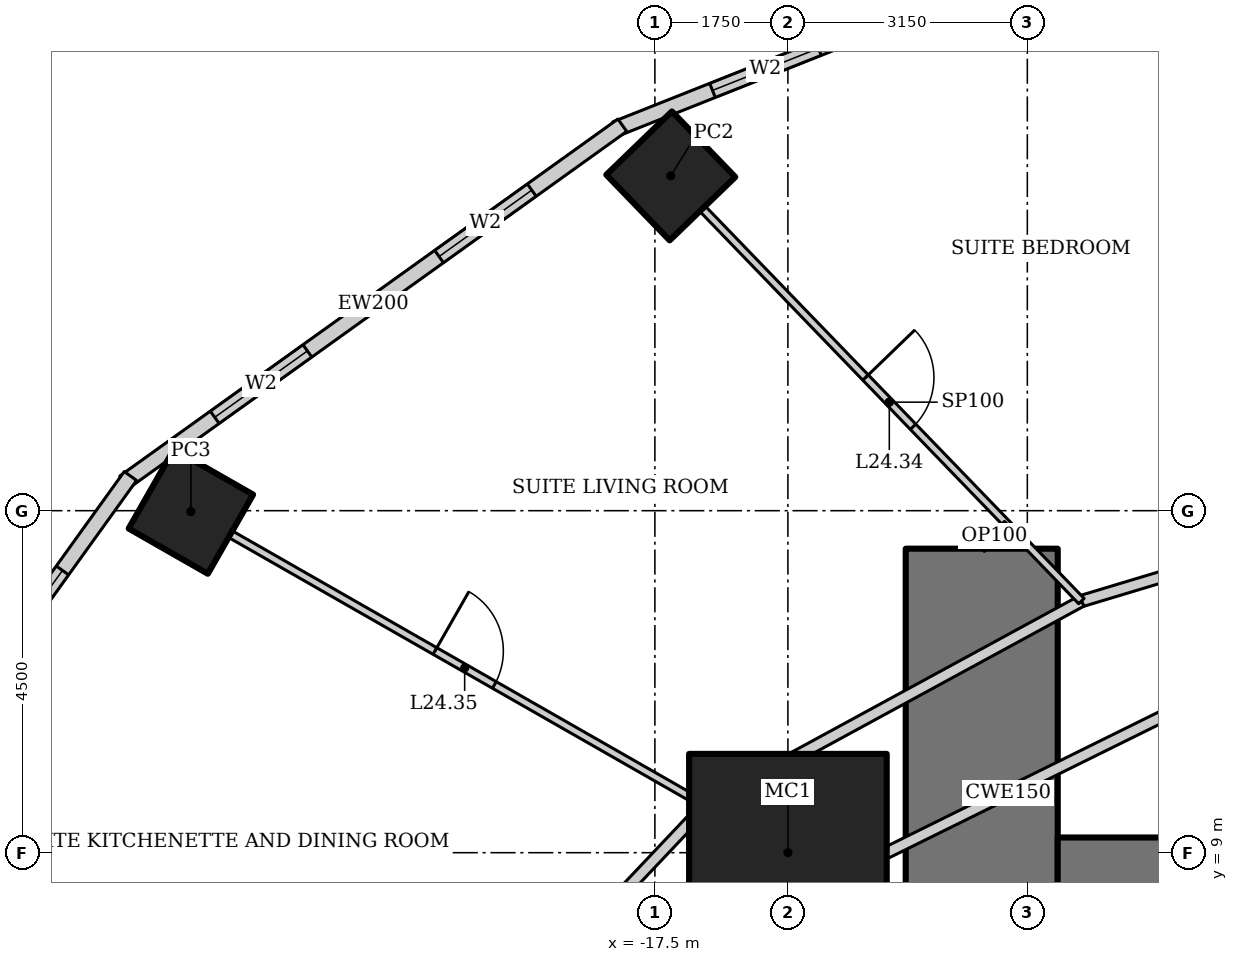
"""IFC4 building model, lengths in metres.
Left out: names, types, materials, properties, quantities, classifications, styles, units other than length and angle.
Written with IfcOpenShell. Run it as: python <this file> out.ifc"""

import sys

from ifc_helpers import new_model, si_unit, direction, frame, frame_2d, origin, origin_2d, place, context, subcontext, project, spatial, rectangle, hollow_rectangle, extrude, element, fill, save


model = new_model("IFC4")
c1 = context("Model", 3, precision=1e-05, world=origin(), true_north=direction((0.0, 1.0)))
c2 = subcontext(c1, "Body", "Model", "MODEL_VIEW")
j1 = project(units=[si_unit("LENGTHUNIT", "METRE"), si_unit("PLANEANGLEUNIT", "RADIAN")], contexts=[c1])
p1 = place(None, origin())
s1 = spatial("IfcSite", under=j1, at=p1, CompositionType="ELEMENT")
p2 = place(p1, origin())
s2 = spatial("IfcBuilding", under=s1, at=p2, CompositionType="ELEMENT")
p3 = place(p2, frame((0.0, 0.0, 101.8)))
s3 = spatial("IfcBuildingStorey", under=s2, at=p3, CompositionType="ELEMENT", Elevation=101.8)
p4 = place(p3, frame((-15.75, 9.0, 0.0), z_axis=(0.0, 0.0, 1.0), x_axis=(1.0, 0.0, 0.0)))
e1 = element("IfcColumn", 1, at=p4, inside=s3, PredefinedType="COLUMN", context=c2, shape_type="SweptSolid", body=[
    extrude(hollow_rectangle(XDim=2.6, YDim=2.6, WallThickness=0.13, at=origin_2d()), origin(), (0.0, 0.0, 1.0), 3.6),
])
p5 = place(p3, frame((-17.291, 17.905, 0.0), z_axis=(0.0, 0.0, 1.0), x_axis=(0.719339800339, 0.694658370459, 0.0)))
e2 = element("IfcColumn", 2, at=p5, inside=s3, PredefinedType="COLUMN", context=c2, shape_type="SweptSolid", body=[
    extrude(hollow_rectangle(XDim=1.2, YDim=1.2, WallThickness=0.1, at=origin_2d()), origin(), (0.0, 0.0, 1.0), 2.28),
])
p6 = place(p3, frame((-23.605, 13.489, 0.0), z_axis=(0.0, 0.0, 1.0), x_axis=(0.496139221777, 0.86824298017, 0.0)))
e3 = element("IfcColumn", 3, at=p6, inside=s3, PredefinedType="COLUMN", context=c2, shape_type="SweptSolid", body=[
    extrude(hollow_rectangle(XDim=1.2, YDim=1.2, WallThickness=0.12, at=origin_2d()), origin(), (0.0, 0.0, 1.0), 2.28),
])
p7 = place(p3, frame((-13.2, 13.0, 0.0), z_axis=(0.0, 0.0, 1.0), x_axis=(0.0, -1.0, 0.0)))
e4 = element("IfcWall", 4, at=p7, inside=s3, PredefinedType="SHEAR", context=c2, shape_type="SweptSolid", body=[
    extrude(rectangle(XDim=26.0, YDim=2.0, at=frame_2d((13.0, 0.0))), origin(), (0.0, 0.0, 1.0), 3.6),
])
p8 = place(p7, frame((12.1, 0.0, 0.0)))
e5 = element("IfcOpeningElement", 5, at=p8, cuts=e4, PredefinedType="OPENING", context=c2, shape_type="SweptSolid", body=[
    extrude(rectangle(XDim=1.8, YDim=2.1, at=frame_2d((0.9, 1.05))), frame((0.0, 1.01, 0.0), z_axis=(0.0, -1.0, 0.0), x_axis=(1.0, 0.0, 0.0)), (0.0, 0.0, 1.0), 2.02),
])
p9 = place(p3, frame((12.2, 8.0, 0.0), z_axis=(0.0, 0.0, 1.0), x_axis=(-1.0, 0.0, 0.0)))
e6 = element("IfcWall", 6, at=p9, inside=s3, PredefinedType="SHEAR", context=c2, shape_type="SweptSolid", body=[
    extrude(rectangle(XDim=24.4, YDim=2.4, at=frame_2d((12.2, 0.0))), origin(), (0.0, 0.0, 1.0), 3.6),
])
p10 = place(p3, frame((-10.869, 21.363, 0.0), z_axis=(0.0, 0.0, 1.0), x_axis=(-0.929358351251, -0.369178892895, 0.0)))
e7 = element("IfcWall", 7, at=p10, inside=s3, PredefinedType="SOLIDWALL", context=c2, shape_type="SweptSolid", body=[
    extrude(rectangle(XDim=7.692, YDim=0.2, at=frame_2d((3.846, 0.0))), origin(), (0.0, 0.0, 1.0), 3.4),
])
p11 = place(p10, frame((1.373, 0.0, 0.5)))
e8 = element("IfcOpeningElement", 8, at=p11, cuts=e7, PredefinedType="OPENING", context=c2, shape_type="SweptSolid", body=[
    extrude(rectangle(XDim=1.5, YDim=2.2, at=frame_2d((0.75, 1.1))), frame((0.0, 0.11, 0.0), z_axis=(0.0, -1.0, 0.0), x_axis=(1.0, 0.0, 0.0)), (0.0, 0.0, 1.0), 0.22),
])
p12 = place(p10, frame((4.819, 0.0, 0.5)))
e9 = element("IfcOpeningElement", 9, at=p12, cuts=e7, PredefinedType="OPENING", context=c2, shape_type="SweptSolid", body=[
    extrude(rectangle(XDim=1.5, YDim=2.2, at=frame_2d((0.75, 1.1))), frame((0.0, 0.11, 0.0), z_axis=(0.0, -1.0, 0.0), x_axis=(1.0, 0.0, 0.0)), (0.0, 0.0, 1.0), 0.22),
])
p13 = place(p3, frame((-17.929, 18.572, 0.0), z_axis=(0.0, 0.0, 1.0), x_axis=(-0.812791321576, -0.582554948112, 0.0)))
e10 = element("IfcWall", 10, at=p13, inside=s3, PredefinedType="SOLIDWALL", context=c2, shape_type="SweptSolid", body=[
    extrude(rectangle(XDim=8.063, YDim=0.2, at=frame_2d((4.032, 0.0))), origin(), (0.0, 0.0, 1.0), 3.4),
])
p14 = place(p13, frame((1.466, 0.0, 0.5)))
e11 = element("IfcOpeningElement", 11, at=p14, cuts=e10, PredefinedType="OPENING", context=c2, shape_type="SweptSolid", body=[
    extrude(rectangle(XDim=1.5, YDim=2.2, at=frame_2d((0.75, 1.1))), frame((0.0, 0.11, 0.0), z_axis=(0.0, -1.0, 0.0), x_axis=(1.0, 0.0, 0.0)), (0.0, 0.0, 1.0), 0.22),
])
p15 = place(p13, frame((5.097, 0.0, 0.5)))
e12 = element("IfcOpeningElement", 12, at=p15, cuts=e10, PredefinedType="OPENING", context=c2, shape_type="SweptSolid", body=[
    extrude(rectangle(XDim=1.5, YDim=2.2, at=frame_2d((0.75, 1.1))), frame((0.0, 0.11, 0.0), z_axis=(0.0, -1.0, 0.0), x_axis=(1.0, 0.0, 0.0)), (0.0, 0.0, 1.0), 0.22),
])
p16 = place(p3, frame((-24.4, 13.957, 0.0), z_axis=(0.0, 0.0, 1.0), x_axis=(-0.583937613703, -0.811798536155, 0.0)))
e13 = element("IfcWall", 13, at=p16, inside=s3, PredefinedType="SOLIDWALL", context=c2, shape_type="SweptSolid", body=[
    extrude(rectangle(XDim=8.323, YDim=0.2, at=frame_2d((4.162, 0.0))), origin(), (0.0, 0.0, 1.0), 3.4),
])
p17 = place(p16, frame((1.531, 0.0, 0.5)))
e14 = element("IfcOpeningElement", 14, at=p17, cuts=e13, PredefinedType="OPENING", context=c2, shape_type="SweptSolid", body=[
    extrude(rectangle(XDim=1.5, YDim=2.2, at=frame_2d((0.75, 1.1))), frame((0.0, 0.11, 0.0), z_axis=(0.0, -1.0, 0.0), x_axis=(1.0, 0.0, 0.0)), (0.0, 0.0, 1.0), 0.22),
])
p18 = place(p16, frame((5.292, 0.0, 0.5)))
e15 = element("IfcOpeningElement", 15, at=p18, cuts=e13, PredefinedType="OPENING", context=c2, shape_type="SweptSolid", body=[
    extrude(rectangle(XDim=1.5, YDim=2.2, at=frame_2d((0.75, 1.1))), frame((0.0, 0.11, 0.0), z_axis=(0.0, -1.0, 0.0), x_axis=(1.0, 0.0, 0.0)), (0.0, 0.0, 1.0), 0.22),
])
p19 = place(p3, frame((-10.912, 21.346, 0.0), z_axis=(0.0, 0.0, 1.0), x_axis=(0.457327273085, -0.889298468059, 0.0)))
e16 = element("IfcWall", 16, at=p19, inside=s3, PredefinedType="PARTITIONING", context=c2, shape_type="SweptSolid", body=[
    extrude(rectangle(XDim=8.511, YDim=0.15, at=frame_2d((4.256, 0.0))), origin(), (0.0, 0.0, 1.0), 2.463),
])
p20 = place(p3, frame((-7.019, 13.776, 0.0), z_axis=(0.0, 0.0, 1.0), x_axis=(-0.957564241242, -0.288219922793, 0.0)))
e17 = element("IfcWall", 17, at=p20, inside=s3, PredefinedType="PARTITIONING", context=c2, shape_type="SweptSolid", body=[
    extrude(rectangle(XDim=5.085, YDim=0.15, at=frame_2d((2.542, 0.0))), origin(), (0.0, 0.0, 1.0), 3.4),
])
p21 = place(p3, frame((-11.888, 12.311, 0.0), z_axis=(0.0, 0.0, 1.0), x_axis=(-0.878450059298, -0.477834169267, 0.0)))
e18 = element("IfcWall", 18, at=p21, inside=s3, PredefinedType="PARTITIONING", context=c2, shape_type="SweptSolid", body=[
    extrude(rectangle(XDim=5.631, YDim=0.15, at=frame_2d((2.815, 0.0))), origin(), (0.0, 0.0, 1.0), 3.4),
])
p22 = place(p3, frame((-16.835, 9.62, 0.0), z_axis=(0.0, 0.0, 1.0), x_axis=(-0.687062608696, -0.726598218916, 0.0)))
e19 = element("IfcWall", 19, at=p22, inside=s3, PredefinedType="PARTITIONING", context=c2, shape_type="SweptSolid", body=[
    extrude(rectangle(XDim=6.039, YDim=0.15, at=frame_2d((3.02, 0.0))), origin(), (0.0, 0.0, 1.0), 3.4),
])
p23 = place(p22, frame((2.771, 0.0, 0.0)))
e20 = element("IfcOpeningElement", 20, at=p23, cuts=e19, PredefinedType="OPENING", context=c2, shape_type="SweptSolid", body=[
    extrude(rectangle(XDim=0.9, YDim=2.1, at=frame_2d((0.45, 1.05))), frame((0.0, 0.085, 0.0), z_axis=(0.0, -1.0, 0.0), x_axis=(1.0, 0.0, 0.0)), (0.0, 0.0, 1.0), 0.17),
])
p24 = place(p3, frame((-10.551, 10.926, 0.0), z_axis=(0.0, 0.0, 1.0), x_axis=(-0.89656943448, -0.442903205177, 0.0)))
e21 = element("IfcWall", 21, at=p24, inside=s3, PredefinedType="PARTITIONING", context=c2, shape_type="SweptSolid", body=[
    extrude(rectangle(XDim=5.126, YDim=0.15, at=frame_2d((2.563, 0.0))), origin(), (0.0, 0.0, 1.0), 3.4),
])
p25 = place(p3, frame((-15.147, 8.656, 0.0), z_axis=(0.0, 0.0, 1.0), x_axis=(-0.720837261072, -0.693104352209, 0.0)))
e22 = element("IfcWall", 22, at=p25, inside=s3, PredefinedType="PARTITIONING", context=c2, shape_type="SweptSolid", body=[
    extrude(rectangle(XDim=5.59, YDim=0.15, at=frame_2d((2.795, 0.0))), origin(), (0.0, 0.0, 1.0), 3.4),
])
p26 = place(p25, frame((2.295, 0.0, 0.0)))
e23 = element("IfcOpeningElement", 23, at=p26, cuts=e22, PredefinedType="OPENING", context=c2, shape_type="SweptSolid", body=[
    extrude(rectangle(XDim=1.0, YDim=2.1, at=frame_2d((0.5, 1.05))), frame((0.0, 0.085, 0.0), z_axis=(0.0, -1.0, 0.0), x_axis=(1.0, 0.0, 0.0)), (0.0, 0.0, 1.0), 0.17),
])
p27 = place(p3, frame((-16.944, 17.545, 0.0), z_axis=(0.0, 0.0, 1.0), x_axis=(0.694669949151, -0.719328618746, 0.0)))
e24 = element("IfcWall", 24, at=p27, inside=s3, PredefinedType="PARTITIONING", context=c2, shape_type="SweptSolid", body=[
    extrude(rectangle(XDim=7.277, YDim=0.1, at=frame_2d((3.639, 0.0))), origin(), (0.0, 0.0, 1.0), 2.463),
])
p28 = place(p27, frame((3.189, 0.0, 0.0)))
e25 = element("IfcOpeningElement", 25, at=p28, cuts=e24, PredefinedType="OPENING", context=c2, shape_type="SweptSolid", body=[
    extrude(rectangle(XDim=0.9, YDim=2.1, at=frame_2d((0.45, 1.05))), frame((0.0, 0.06, 0.0), z_axis=(0.0, -1.0, 0.0), x_axis=(1.0, 0.0, 0.0)), (0.0, 0.0, 1.0), 0.12),
])
p29 = place(p3, frame((-23.171, 13.24, 0.0), z_axis=(0.0, 0.0, 1.0), x_axis=(0.868253436131, -0.496120923412, 0.0)))
e26 = element("IfcWall", 26, at=p29, inside=s3, PredefinedType="PARTITIONING", context=c2, shape_type="SweptSolid", body=[
    extrude(rectangle(XDim=7.297, YDim=0.1, at=frame_2d((3.649, 0.0))), origin(), (0.0, 0.0, 1.0), 2.2),
])
p30 = place(p29, frame((3.198, 0.0, 0.0)))
e27 = element("IfcOpeningElement", 27, at=p30, cuts=e26, PredefinedType="OPENING", context=c2, shape_type="SweptSolid", body=[
    extrude(rectangle(XDim=0.9, YDim=2.1, at=frame_2d((0.45, 1.05))), frame((0.0, 0.06, 0.0), z_axis=(0.0, -1.0, 0.0), x_axis=(1.0, 0.0, 0.0)), (0.0, 0.0, 1.0), 0.12),
])
p31 = place(p3, frame((-13.2, 13.0, 0.0), z_axis=(0.0, 0.0, 1.0), x_axis=(0.719347134512, 0.69465077562, 0.0)))
e28 = element("IfcWall", 28, at=p31, inside=s3, PredefinedType="PARTITIONING", context=c2, shape_type="SweptSolid", body=[
    extrude(rectangle(XDim=0.465, YDim=0.1, at=frame_2d((0.232, 0.0))), origin(), (0.0, 0.0, 1.0), 3.4),
])
p32 = place(p12, origin())
e29 = element("IfcWindow", 29, at=p32, inside=s3, PartitioningType="SINGLE_PANEL", PredefinedType="WINDOW", context=c2, shape_type="SweptSolid", body=[
    extrude(rectangle(XDim=1.5, YDim=2.2, at=frame_2d((0.75, 1.1))), frame((0.0, 0.03, 0.0), z_axis=(0.0, -1.0, 0.0), x_axis=(1.0, 0.0, 0.0)), (0.0, 0.0, 1.0), 0.06),
])
fill(e9, e29)
p33 = place(p14, origin())
e30 = element("IfcWindow", 30, at=p33, inside=s3, PartitioningType="SINGLE_PANEL", PredefinedType="WINDOW", context=c2, shape_type="SweptSolid", body=[
    extrude(rectangle(XDim=1.5, YDim=2.2, at=frame_2d((0.75, 1.1))), frame((0.0, 0.03, 0.0), z_axis=(0.0, -1.0, 0.0), x_axis=(1.0, 0.0, 0.0)), (0.0, 0.0, 1.0), 0.06),
])
fill(e11, e30)
p34 = place(p15, origin())
e31 = element("IfcWindow", 31, at=p34, inside=s3, PartitioningType="SINGLE_PANEL", PredefinedType="WINDOW", context=c2, shape_type="SweptSolid", body=[
    extrude(rectangle(XDim=1.5, YDim=2.2, at=frame_2d((0.75, 1.1))), frame((0.0, 0.03, 0.0), z_axis=(0.0, -1.0, 0.0), x_axis=(1.0, 0.0, 0.0)), (0.0, 0.0, 1.0), 0.06),
])
fill(e12, e31)
p35 = place(p17, origin())
e32 = element("IfcWindow", 32, at=p35, inside=s3, PartitioningType="SINGLE_PANEL", PredefinedType="WINDOW", context=c2, shape_type="SweptSolid", body=[
    extrude(rectangle(XDim=1.5, YDim=2.2, at=frame_2d((0.75, 1.1))), frame((0.0, 0.03, 0.0), z_axis=(0.0, -1.0, 0.0), x_axis=(1.0, 0.0, 0.0)), (0.0, 0.0, 1.0), 0.06),
])
fill(e14, e32)
p36 = place(p28, origin())
e33 = element("IfcDoor", 33, at=p36, inside=s3, OperationType="SINGLE_SWING_LEFT", PredefinedType="DOOR", context=c2, shape_type="SweptSolid", body=[
    extrude(rectangle(XDim=0.9, YDim=2.1, at=frame_2d((0.45, 1.05))), frame((0.0, 0.025, 0.0), z_axis=(0.0, -1.0, 0.0), x_axis=(1.0, 0.0, 0.0)), (0.0, 0.0, 1.0), 0.05),
])
fill(e25, e33)
p37 = place(p30, origin())
e34 = element("IfcDoor", 34, at=p37, inside=s3, OperationType="SINGLE_SWING_LEFT", PredefinedType="DOOR", context=c2, shape_type="SweptSolid", body=[
    extrude(rectangle(XDim=0.9, YDim=2.1, at=frame_2d((0.45, 1.05))), frame((0.0, 0.025, 0.0), z_axis=(0.0, -1.0, 0.0), x_axis=(1.0, 0.0, 0.0)), (0.0, 0.0, 1.0), 0.05),
])
fill(e27, e34)
save(model, sys.argv[1])
